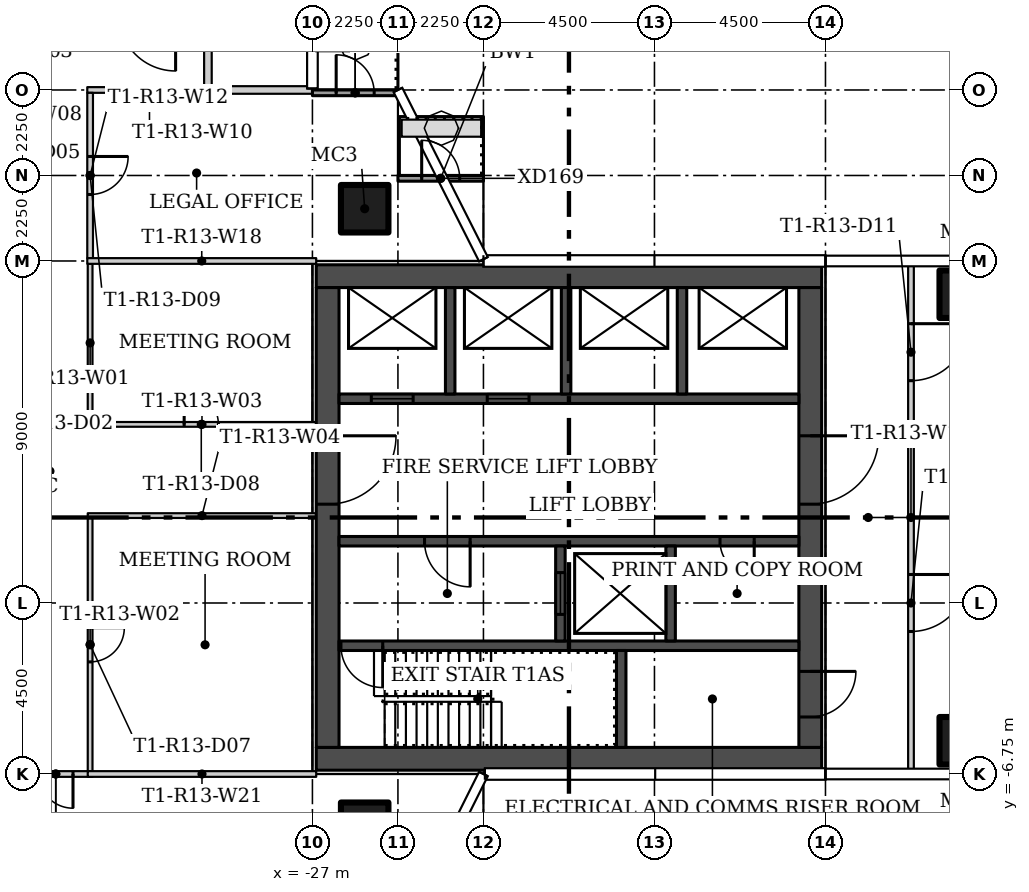
"""IFC4 building model, lengths in metres.
Left out: names, types, materials, properties, quantities, classifications, styles, units other than length and angle.
Written with IfcOpenShell. Run it as: python <this file> out.ifc"""

import sys

from ifc_helpers import new_model, si_unit, direction, frame, frame_2d, origin, origin_2d, place, context, subcontext, project, spatial, rectangle, hollow_rectangle, extrude, element, fill, save


model = new_model("IFC4")
c1 = context("Model", 3, precision=1e-05, world=origin(), true_north=direction((0.0, 1.0)))
c2 = subcontext(c1, "Body", "Model", "MODEL_VIEW")
j1 = project(units=[si_unit("LENGTHUNIT", "METRE"), si_unit("PLANEANGLEUNIT", "RADIAN")], contexts=[c1])
p1 = place(None, origin())
s1 = spatial("IfcSite", under=j1, at=p1, CompositionType="ELEMENT")
p2 = place(p1, origin())
s2 = spatial("IfcBuilding", under=s1, at=p2, CompositionType="ELEMENT")
p3 = place(p2, frame((0.0, 0.0, 120.9)))
s3 = spatial("IfcBuildingStorey", under=s2, at=p3, CompositionType="ELEMENT", Elevation=120.9)
for number, where in (
    (1, (-25.625, 8.125, 0.0)),
    (2, (-25.625, -8.125, 0.0)),
    (3, (-9.875, -5.875, 0.0)),
    (4, (-9.875, 5.875, 0.0)),
):
    element("IfcColumn", number, at=place(p3, frame(where)), inside=s3, PredefinedType="COLUMN", context=c2, shape_type="SweptSolid", body=[
        extrude(hollow_rectangle(XDim=1.25, YDim=1.25, WallThickness=0.05, at=origin_2d()), origin(), (0.0, 0.0, 1.0), 3.55),
    ])
p4 = place(p3, frame((-32.85, 6.675, 0.0), z_axis=(0.0, 0.0, 1.0), x_axis=(0.0, -1.0, 0.0)))
e5 = element("IfcWall", 5, at=p4, inside=s3, PredefinedType="PARTITIONING", context=c2, shape_type="SweptSolid", body=[
    extrude(rectangle(XDim=4.162, YDim=0.125, at=frame_2d((2.081, 0.0))), origin(), (0.0, 0.0, 1.0), 3.55),
])
p5 = place(p3, frame((-32.85, -0.013, 0.0), z_axis=(0.0, 0.0, 1.0), x_axis=(0.0, -1.0, 0.0)))
e6 = element("IfcWall", 6, at=p5, inside=s3, PredefinedType="PARTITIONING", context=c2, shape_type="SweptSolid", body=[
    extrude(rectangle(XDim=6.662, YDim=0.125, at=frame_2d((3.331, 0.0))), origin(), (0.0, 0.0, 1.0), 3.55),
])
p6 = place(p5, frame((2.887, 0.0, 0.0)))
e7 = element("IfcOpeningElement", 7, at=p6, cuts=e6, PredefinedType="OPENING", context=c2, shape_type="SweptSolid", body=[
    extrude(rectangle(XDim=0.9, YDim=2.1, at=frame_2d((0.45, 1.05))), frame((0.0, 0.073, 0.0), z_axis=(0.0, -1.0, 0.0), x_axis=(1.0, 0.0, 0.0)), (0.0, 0.0, 1.0), 0.145),
])
p7 = place(p3, frame((-32.912, 2.45, 0.0)))
e8 = element("IfcWall", 8, at=p7, inside=s3, PredefinedType="PARTITIONING", context=c2, shape_type="SweptSolid", body=[
    extrude(rectangle(XDim=6.012, YDim=0.125, at=frame_2d((3.006, 0.0))), origin(), (0.0, 0.0, 1.0), 3.55),
])
p8 = place(p7, frame((2.537, 0.0, 0.0)))
e9 = element("IfcOpeningElement", 9, at=p8, cuts=e8, PredefinedType="OPENING", context=c2, shape_type="SweptSolid", body=[
    extrude(rectangle(XDim=0.9, YDim=2.1, at=frame_2d((0.45, 1.05))), frame((0.0, 0.073, 0.0), z_axis=(0.0, -1.0, 0.0), x_axis=(1.0, 0.0, 0.0)), (0.0, 0.0, 1.0), 0.145),
])
p9 = place(p3, frame((-26.9, 0.05, 0.0), z_axis=(0.0, 0.0, 1.0), x_axis=(-1.0, 0.0, 0.0)))
e10 = element("IfcWall", 10, at=p9, inside=s3, PredefinedType="PARTITIONING", context=c2, shape_type="SweptSolid", body=[
    extrude(rectangle(XDim=6.012, YDim=0.125, at=frame_2d((3.006, 0.0))), origin(), (0.0, 0.0, 1.0), 3.55),
])
p10 = place(p3, frame((-29.65, 11.25, 0.0), z_axis=(0.0, 0.0, 1.0), x_axis=(-1.0, 0.0, 0.0)))
e11 = element("IfcWall", 11, at=p10, inside=s3, PredefinedType="PARTITIONING", context=c2, shape_type="SweptSolid", body=[
    extrude(rectangle(XDim=3.275, YDim=0.15, at=frame_2d((1.637, 0.0))), origin(), (0.0, 0.0, 1.0), 3.55),
])
p11 = place(p3, frame((-32.85, 11.175, 0.0), z_axis=(0.0, 0.0, 1.0), x_axis=(0.0, -1.0, 0.0)))
e12 = element("IfcWall", 12, at=p11, inside=s3, PredefinedType="PARTITIONING", context=c2, shape_type="SweptSolid", body=[
    extrude(rectangle(XDim=4.35, YDim=0.15, at=frame_2d((2.175, 0.0))), origin(), (0.0, 0.0, 1.0), 3.55),
])
p12 = place(p11, frame((1.675, 0.0, 0.0)))
e13 = element("IfcOpeningElement", 13, at=p12, cuts=e12, PredefinedType="OPENING", context=c2, shape_type="SweptSolid", body=[
    extrude(rectangle(XDim=1.0, YDim=2.4, at=frame_2d((0.5, 1.2))), frame((0.0, 0.085, 0.0), z_axis=(0.0, -1.0, 0.0), x_axis=(1.0, 0.0, 0.0)), (0.0, 0.0, 1.0), 0.17),
])
p13 = place(p3, frame((-29.75, 11.35, 0.0), z_axis=(0.0, 0.0, 1.0), x_axis=(0.0, 1.0, 0.0)))
e14 = element("IfcWall", 14, at=p13, inside=s3, PredefinedType="PARTITIONING", context=c2, shape_type="SweptSolid", body=[
    extrude(rectangle(XDim=1.8, YDim=0.2, at=frame_2d((0.9, 0.0))), origin(), (0.0, 0.0, 1.0), 3.55),
])
p14 = place(p3, frame((-32.787, -6.75, 0.0), z_axis=(0.0, 0.0, 1.0), x_axis=(-1.0, 0.0, 0.0)))
e15 = element("IfcWall", 15, at=p14, inside=s3, PredefinedType="PARTITIONING", context=c2, shape_type="SweptSolid", body=[
    extrude(rectangle(XDim=1.938, YDim=0.15, at=frame_2d((0.969, 0.0))), origin(), (0.0, 0.0, 1.0), 3.55),
])
p15 = place(p14, frame((0.513, 0.0, 0.0)))
e16 = element("IfcOpeningElement", 16, at=p15, cuts=e15, PredefinedType="OPENING", context=c2, shape_type="SweptSolid", body=[
    extrude(rectangle(XDim=0.9, YDim=2.1, at=frame_2d((0.45, 1.05))), frame((0.0, 0.085, 0.0), z_axis=(0.0, -1.0, 0.0), x_axis=(1.0, 0.0, 0.0)), (0.0, 0.0, 1.0), 0.17),
])
p16 = place(p3, frame((-11.25, 6.655, 0.0), z_axis=(0.0, 0.0, 1.0), x_axis=(0.0, -1.0, 0.0)))
e17 = element("IfcWall", 17, at=p16, inside=s3, PredefinedType="PARTITIONING", context=c2, shape_type="SweptSolid", body=[
    extrude(rectangle(XDim=13.31, YDim=0.15, at=frame_2d((6.655, 0.0))), origin(), (0.0, 0.0, 1.0), 3.55),
])
p17 = place(p16, frame((1.555, 0.0, 0.0)))
e18 = element("IfcOpeningElement", 18, at=p17, cuts=e17, PredefinedType="OPENING", context=c2, shape_type="SweptSolid", body=[
    extrude(rectangle(XDim=1.5, YDim=2.1, at=frame_2d((0.75, 1.05))), frame((0.0, 0.085, 0.0), z_axis=(0.0, -1.0, 0.0), x_axis=(1.0, 0.0, 0.0)), (0.0, 0.0, 1.0), 0.17),
])
p18 = place(p16, frame((8.155, 0.0, 0.0)))
e19 = element("IfcOpeningElement", 19, at=p18, cuts=e17, PredefinedType="OPENING", context=c2, shape_type="SweptSolid", body=[
    extrude(rectangle(XDim=1.5, YDim=2.1, at=frame_2d((0.75, 1.05))), frame((0.0, 0.085, 0.0), z_axis=(0.0, -1.0, 0.0), x_axis=(1.0, 0.0, 0.0)), (0.0, 0.0, 1.0), 0.17),
])
p19 = place(p3, frame((-26.9, 6.75, 0.0), z_axis=(0.0, 0.0, 1.0), x_axis=(-1.0, 0.0, 0.0)))
e20 = element("IfcWall", 20, at=p19, inside=s3, PredefinedType="PARTITIONING", context=c2, shape_type="SweptSolid", body=[
    extrude(rectangle(XDim=6.025, YDim=0.15, at=frame_2d((3.012, 0.0))), origin(), (0.0, 0.0, 1.0), 3.55),
])
p20 = place(p3, frame((-32.912, -6.75, 0.0)))
e21 = element("IfcWall", 21, at=p20, inside=s3, PredefinedType="PARTITIONING", context=c2, shape_type="SweptSolid", body=[
    extrude(rectangle(XDim=6.012, YDim=0.15, at=frame_2d((3.006, 0.0))), origin(), (0.0, 0.0, 1.0), 3.55),
])
p21 = place(p3, frame((-27.0, 11.25, 0.0), z_axis=(0.0, 0.0, 1.0), x_axis=(-1.0, 0.0, 0.0)))
e22 = element("IfcWall", 22, at=p21, inside=s3, PredefinedType="PARTITIONING", context=c2, shape_type="SweptSolid", body=[
    extrude(rectangle(XDim=2.85, YDim=0.2, at=frame_2d((1.425, 0.0))), origin(), (0.0, 0.0, 1.0), 3.55),
])
p22 = place(p3, frame((-4.595, 2.25, 0.0), z_axis=(0.0, 0.0, 1.0), x_axis=(-1.0, 0.0, 0.0)))
e23 = element("IfcWall", 23, at=p22, inside=s3, PredefinedType="PARTITIONING", context=c2, shape_type="SweptSolid", body=[
    extrude(rectangle(XDim=6.58, YDim=0.15, at=frame_2d((3.29, 0.0))), origin(), (0.0, 0.0, 1.0), 3.55),
])
p23 = place(p3, frame((-24.75, 8.925, 0.0)))
e24 = element("IfcWall", 24, at=p23, inside=s3, PredefinedType="SOLIDWALL", context=c2, shape_type="SweptSolid", body=[
    extrude(rectangle(XDim=2.25, YDim=0.15, at=frame_2d((1.125, 0.0))), origin(), (0.0, 0.0, 1.0), 3.45),
])
p24 = place(p23, frame((0.625, 0.0, 0.0)))
e25 = element("IfcOpeningElement", 25, at=p24, cuts=e24, PredefinedType="OPENING", context=c2, shape_type="SweptSolid", body=[
    extrude(rectangle(XDim=1.0, YDim=2.4, at=frame_2d((0.5, 1.2))), frame((0.0, 0.085, 0.0), z_axis=(0.0, -1.0, 0.0), x_axis=(1.0, 0.0, 0.0)), (0.0, 0.0, 1.0), 0.17),
])
p25 = place(p3, frame((-27.0, 11.175, 0.0)))
e26 = element("IfcWall", 26, at=p25, inside=s3, PredefinedType="SOLIDWALL", context=c2, shape_type="SweptSolid", body=[
    extrude(rectangle(XDim=2.25, YDim=0.15, at=frame_2d((1.125, 0.0))), origin(), (0.0, 0.0, 1.0), 3.45),
])
p26 = place(p25, frame((0.625, 0.0, 0.0)))
e27 = element("IfcOpeningElement", 27, at=p26, cuts=e26, PredefinedType="OPENING", context=c2, shape_type="SweptSolid", body=[
    extrude(rectangle(XDim=1.0, YDim=2.4, at=frame_2d((0.5, 1.2))), frame((0.0, 0.085, 0.0), z_axis=(0.0, -1.0, 0.0), x_axis=(1.0, 0.0, 0.0)), (0.0, 0.0, 1.0), 0.17),
])
for number, where in (
    (28, (-26.9, -6.35, 0.0)),
    (29, (-26.9, 6.35, 0.0)),
):
    element("IfcWall", number, at=place(p3, frame(where)), inside=s3, PredefinedType="SHEAR", context=c2, shape_type="SweptSolid", body=[
        extrude(rectangle(XDim=13.3, YDim=0.6, at=frame_2d((6.65, 0.0))), origin(), (0.0, 0.0, 1.0), 3.55),
    ])
p27 = place(p3, frame((-26.6, 6.05, 0.0), z_axis=(0.0, 0.0, 1.0), x_axis=(0.0, -1.0, 0.0)))
e30 = element("IfcWall", 30, at=p27, inside=s3, PredefinedType="SHEAR", context=c2, shape_type="SweptSolid", body=[
    extrude(rectangle(XDim=12.1, YDim=0.6, at=frame_2d((6.05, 0.0))), origin(), (0.0, 0.0, 1.0), 3.55),
])
p28 = place(p27, frame((3.9, 0.0, 0.0)))
e31 = element("IfcOpeningElement", 31, at=p28, cuts=e30, PredefinedType="OPENING", context=c2, shape_type="SweptSolid", body=[
    extrude(rectangle(XDim=1.8, YDim=2.4, at=frame_2d((0.9, 1.2))), frame((0.0, 0.31, 0.0), z_axis=(0.0, -1.0, 0.0), x_axis=(1.0, 0.0, 0.0)), (0.0, 0.0, 1.0), 0.62),
])
p29 = place(p3, frame((-13.9, 6.05, 0.0), z_axis=(0.0, 0.0, 1.0), x_axis=(0.0, -1.0, 0.0)))
e32 = element("IfcWall", 32, at=p29, inside=s3, PredefinedType="SHEAR", context=c2, shape_type="SweptSolid", body=[
    extrude(rectangle(XDim=12.1, YDim=0.6, at=frame_2d((6.05, 0.0))), origin(), (0.0, 0.0, 1.0), 3.55),
])
p30 = place(p29, frame((10.1, 0.0, 0.0)))
e33 = element("IfcOpeningElement", 33, at=p30, cuts=e32, PredefinedType="OPENING", context=c2, shape_type="SweptSolid", body=[
    extrude(rectangle(XDim=1.2, YDim=2.1, at=frame_2d((0.6, 1.05))), frame((0.0, 0.31, 0.0), z_axis=(0.0, -1.0, 0.0), x_axis=(1.0, 0.0, 0.0)), (0.0, 0.0, 1.0), 0.62),
])
p31 = place(p29, frame((3.9, 0.0, 0.0)))
e34 = element("IfcOpeningElement", 34, at=p31, cuts=e32, PredefinedType="OPENING", context=c2, shape_type="SweptSolid", body=[
    extrude(rectangle(XDim=1.8, YDim=2.4, at=frame_2d((0.9, 1.2))), frame((0.0, 0.31, 0.0), z_axis=(0.0, -1.0, 0.0), x_axis=(1.0, 0.0, 0.0)), (0.0, 0.0, 1.0), 0.62),
])
p32 = place(p3, frame((-14.2, -3.375, 0.0), z_axis=(0.0, 0.0, 1.0), x_axis=(-1.0, 0.0, 0.0)))
e35 = element("IfcWall", 35, at=p32, inside=s3, PredefinedType="SHEAR", context=c2, shape_type="SweptSolid", body=[
    extrude(rectangle(XDim=12.1, YDim=0.25, at=frame_2d((6.05, 0.0))), origin(), (0.0, 0.0, 1.0), 3.55),
])
p33 = place(p32, frame((10.95, 0.0, 0.0)))
e36 = element("IfcOpeningElement", 36, at=p33, cuts=e35, PredefinedType="OPENING", context=c2, shape_type="SweptSolid", body=[
    extrude(rectangle(XDim=1.1, YDim=2.1, at=frame_2d((0.55, 1.05))), frame((0.0, 0.135, 0.0), z_axis=(0.0, -1.0, 0.0), x_axis=(1.0, 0.0, 0.0)), (0.0, 0.0, 1.0), 0.27),
])
p34 = place(p3, frame((-18.875, -6.05, 0.0), z_axis=(0.0, 0.0, 1.0), x_axis=(0.0, 1.0, 0.0)))
e37 = element("IfcWall", 37, at=p34, inside=s3, PredefinedType="SHEAR", context=c2, shape_type="SweptSolid", body=[
    extrude(rectangle(XDim=2.55, YDim=0.25, at=frame_2d((1.275, 0.0))), origin(), (0.0, 0.0, 1.0), 3.55),
])
p35 = place(p3, frame((-14.2, -0.625, 0.0), z_axis=(0.0, 0.0, 1.0), x_axis=(-1.0, 0.0, 0.0)))
e38 = element("IfcWall", 38, at=p35, inside=s3, PredefinedType="SHEAR", context=c2, shape_type="SweptSolid", body=[
    extrude(rectangle(XDim=12.1, YDim=0.25, at=frame_2d((6.05, 0.0))), origin(), (0.0, 0.0, 1.0), 3.55),
])
p36 = place(p35, frame((8.65, 0.0, 0.0)))
e39 = element("IfcOpeningElement", 39, at=p36, cuts=e38, PredefinedType="OPENING", context=c2, shape_type="SweptSolid", body=[
    extrude(rectangle(XDim=1.2, YDim=2.1, at=frame_2d((0.6, 1.05))), frame((0.0, 0.135, 0.0), z_axis=(0.0, -1.0, 0.0), x_axis=(1.0, 0.0, 0.0)), (0.0, 0.0, 1.0), 0.27),
])
p37 = place(p35, frame((1.175, 0.0, 0.0)))
e40 = element("IfcOpeningElement", 40, at=p37, cuts=e38, PredefinedType="OPENING", context=c2, shape_type="SweptSolid", body=[
    extrude(rectangle(XDim=0.9, YDim=2.1, at=frame_2d((0.45, 1.05))), frame((0.0, 0.135, 0.0), z_axis=(0.0, -1.0, 0.0), x_axis=(1.0, 0.0, 0.0)), (0.0, 0.0, 1.0), 0.27),
])
p38 = place(p3, frame((-20.475, -3.25, 0.0), z_axis=(0.0, 0.0, 1.0), x_axis=(0.0, 1.0, 0.0)))
e41 = element("IfcWall", 41, at=p38, inside=s3, PredefinedType="SHEAR", context=c2, shape_type="SweptSolid", body=[
    extrude(rectangle(XDim=2.5, YDim=0.25, at=frame_2d((1.25, 0.0))), origin(), (0.0, 0.0, 1.0), 3.55),
])
p39 = place(p38, frame((0.7, 0.0, 0.0)))
e42 = element("IfcOpeningElement", 42, at=p39, cuts=e41, PredefinedType="OPENING", context=c2, shape_type="SweptSolid", body=[
    extrude(rectangle(XDim=1.1, YDim=2.1, at=frame_2d((0.55, 1.05))), frame((0.0, 0.135, 0.0), z_axis=(0.0, -1.0, 0.0), x_axis=(1.0, 0.0, 0.0)), (0.0, 0.0, 1.0), 0.27),
])
p40 = place(p3, frame((-17.575, -3.25, 0.0), z_axis=(0.0, 0.0, 1.0), x_axis=(0.0, 1.0, 0.0)))
e43 = element("IfcWall", 43, at=p40, inside=s3, PredefinedType="SHEAR", context=c2, shape_type="SweptSolid", body=[
    extrude(rectangle(XDim=2.5, YDim=0.25, at=frame_2d((1.25, 0.0))), origin(), (0.0, 0.0, 1.0), 3.55),
])
p41 = place(p3, frame((-26.3, 3.125, 0.0)))
e44 = element("IfcWall", 44, at=p41, inside=s3, PredefinedType="SHEAR", context=c2, shape_type="SweptSolid", body=[
    extrude(rectangle(XDim=12.1, YDim=0.25, at=frame_2d((6.05, 0.0))), origin(), (0.0, 0.0, 1.0), 3.55),
])
p42 = place(p41, frame((0.85, 0.0, 0.0)))
e45 = element("IfcOpeningElement", 45, at=p42, cuts=e44, PredefinedType="OPENING", context=c2, shape_type="SweptSolid", body=[
    extrude(rectangle(XDim=1.1, YDim=2.1, at=frame_2d((0.55, 1.05))), frame((0.0, 0.135, 0.0), z_axis=(0.0, -1.0, 0.0), x_axis=(1.0, 0.0, 0.0)), (0.0, 0.0, 1.0), 0.27),
])
p43 = place(p41, frame((3.9, 0.0, 0.0)))
e46 = element("IfcOpeningElement", 46, at=p43, cuts=e44, PredefinedType="OPENING", context=c2, shape_type="SweptSolid", body=[
    extrude(rectangle(XDim=1.1, YDim=2.1, at=frame_2d((0.55, 1.05))), frame((0.0, 0.135, 0.0), z_axis=(0.0, -1.0, 0.0), x_axis=(1.0, 0.0, 0.0)), (0.0, 0.0, 1.0), 0.27),
])
for number, where, z_axis, x_axis in (
    (47, (-23.375, 3.25, 0.0), (0.0, 0.0, 1.0), (0.0, 1.0, 0.0)),
    (48, (-20.325, 3.25, 0.0), (0.0, 0.0, 1.0), (0.0, 1.0, 0.0)),
    (49, (-17.275, 3.25, 0.0), (0.0, 0.0, 1.0), (0.0, 1.0, 0.0)),
):
    element("IfcWall", number, at=place(p3, frame(where, z_axis=z_axis, x_axis=x_axis)), inside=s3, PredefinedType="SHEAR", context=c2, shape_type="SweptSolid", body=[
        extrude(rectangle(XDim=2.8, YDim=0.25, at=frame_2d((1.4, 0.0))), origin(), (0.0, 0.0, 1.0), 3.55),
    ])
p44 = place(p15, origin())
e50 = element("IfcDoor", 50, at=p44, inside=s3, OperationType="SINGLE_SWING_RIGHT", PredefinedType="DOOR", context=c2, shape_type="SweptSolid", body=[
    extrude(rectangle(XDim=0.9, YDim=2.1, at=frame_2d((0.45, 1.05))), frame((0.0, 0.025, 0.0), z_axis=(0.0, -1.0, 0.0), x_axis=(1.0, 0.0, 0.0)), (0.0, 0.0, 1.0), 0.05),
])
fill(e16, e50)
p45 = place(p6, origin())
e51 = element("IfcDoor", 51, at=p45, inside=s3, OperationType="SINGLE_SWING_LEFT", PredefinedType="DOOR", context=c2, shape_type="SweptSolid", body=[
    extrude(rectangle(XDim=0.9, YDim=2.1, at=frame_2d((0.45, 1.05))), frame((0.0, 0.025, 0.0), z_axis=(0.0, -1.0, 0.0), x_axis=(1.0, 0.0, 0.0)), (0.0, 0.0, 1.0), 0.05),
])
fill(e7, e51)
p46 = place(p8, origin())
e52 = element("IfcDoor", 52, at=p46, inside=s3, OperationType="SINGLE_SWING_RIGHT", PredefinedType="DOOR", context=c2, shape_type="SweptSolid", body=[
    extrude(rectangle(XDim=0.9, YDim=2.1, at=frame_2d((0.45, 1.05))), frame((0.0, 0.025, 0.0), z_axis=(0.0, -1.0, 0.0), x_axis=(1.0, 0.0, 0.0)), (0.0, 0.0, 1.0), 0.05),
])
fill(e9, e52)
p47 = place(p12, origin())
e53 = element("IfcDoor", 53, at=p47, inside=s3, OperationType="SINGLE_SWING_LEFT", PredefinedType="DOOR", context=c2, shape_type="SweptSolid", body=[
    extrude(rectangle(XDim=1.0, YDim=2.4, at=frame_2d((0.5, 1.2))), frame((0.0, 0.025, 0.0), z_axis=(0.0, -1.0, 0.0), x_axis=(1.0, 0.0, 0.0)), (0.0, 0.0, 1.0), 0.05),
])
fill(e13, e53)
p48 = place(p17, origin())
e54 = element("IfcDoor", 54, at=p48, inside=s3, OperationType="DOUBLE_DOOR_SINGLE_SWING", PredefinedType="DOOR", context=c2, shape_type="SweptSolid", body=[
    extrude(rectangle(XDim=1.5, YDim=2.1, at=frame_2d((0.75, 1.05))), frame((0.0, 0.025, 0.0), z_axis=(0.0, -1.0, 0.0), x_axis=(1.0, 0.0, 0.0)), (0.0, 0.0, 1.0), 0.05),
])
fill(e18, e54)
p49 = place(p18, origin())
e55 = element("IfcDoor", 55, at=p49, inside=s3, OperationType="DOUBLE_DOOR_SINGLE_SWING", PredefinedType="DOOR", context=c2, shape_type="SweptSolid", body=[
    extrude(rectangle(XDim=1.5, YDim=2.1, at=frame_2d((0.75, 1.05))), frame((0.0, 0.025, 0.0), z_axis=(0.0, -1.0, 0.0), x_axis=(1.0, 0.0, 0.0)), (0.0, 0.0, 1.0), 0.05),
])
fill(e19, e55)
p50 = place(p24, origin())
e56 = element("IfcDoor", 56, at=p50, inside=s3, OperationType="SINGLE_SWING_RIGHT", PredefinedType="DOOR", context=c2, shape_type="SweptSolid", body=[
    extrude(rectangle(XDim=1.0, YDim=2.4, at=frame_2d((0.5, 1.2))), frame((0.0, 0.025, 0.0), z_axis=(0.0, -1.0, 0.0), x_axis=(1.0, 0.0, 0.0)), (0.0, 0.0, 1.0), 0.05),
])
fill(e25, e56)
p51 = place(p26, origin())
e57 = element("IfcDoor", 57, at=p51, inside=s3, OperationType="SINGLE_SWING_LEFT", PredefinedType="DOOR", context=c2, shape_type="SweptSolid", body=[
    extrude(rectangle(XDim=1.0, YDim=2.4, at=frame_2d((0.5, 1.2))), frame((0.0, 0.025, 0.0), z_axis=(0.0, -1.0, 0.0), x_axis=(1.0, 0.0, 0.0)), (0.0, 0.0, 1.0), 0.05),
])
fill(e27, e57)
p52 = place(p28, origin())
e58 = element("IfcDoor", 58, at=p52, inside=s3, OperationType="DOUBLE_DOOR_SINGLE_SWING", PredefinedType="DOOR", context=c2, shape_type="SweptSolid", body=[
    extrude(rectangle(XDim=1.8, YDim=2.4, at=frame_2d((0.9, 1.2))), frame((0.0, 0.025, 0.0), z_axis=(0.0, -1.0, 0.0), x_axis=(1.0, 0.0, 0.0)), (0.0, 0.0, 1.0), 0.05),
])
fill(e31, e58)
p53 = place(p30, origin())
e59 = element("IfcDoor", 59, at=p53, inside=s3, OperationType="SINGLE_SWING_RIGHT", PredefinedType="DOOR", context=c2, shape_type="SweptSolid", body=[
    extrude(rectangle(XDim=1.2, YDim=2.1, at=frame_2d((0.6, 1.05))), frame((0.0, 0.025, 0.0), z_axis=(0.0, -1.0, 0.0), x_axis=(1.0, 0.0, 0.0)), (0.0, 0.0, 1.0), 0.05),
])
fill(e33, e59)
p54 = place(p31, origin())
e60 = element("IfcDoor", 60, at=p54, inside=s3, OperationType="DOUBLE_DOOR_SINGLE_SWING", PredefinedType="DOOR", context=c2, shape_type="SweptSolid", body=[
    extrude(rectangle(XDim=1.8, YDim=2.4, at=frame_2d((0.9, 1.2))), frame((0.0, 0.025, 0.0), z_axis=(0.0, -1.0, 0.0), x_axis=(1.0, 0.0, 0.0)), (0.0, 0.0, 1.0), 0.05),
])
fill(e34, e60)
p55 = place(p33, origin())
e61 = element("IfcDoor", 61, at=p55, inside=s3, OperationType="SINGLE_SWING_RIGHT", PredefinedType="DOOR", context=c2, shape_type="SweptSolid", body=[
    extrude(rectangle(XDim=1.1, YDim=2.1, at=frame_2d((0.55, 1.05))), frame((0.0, 0.025, 0.0), z_axis=(0.0, -1.0, 0.0), x_axis=(1.0, 0.0, 0.0)), (0.0, 0.0, 1.0), 0.05),
])
fill(e36, e61)
p56 = place(p36, origin())
e62 = element("IfcDoor", 62, at=p56, inside=s3, OperationType="SINGLE_SWING_RIGHT", PredefinedType="DOOR", context=c2, shape_type="SweptSolid", body=[
    extrude(rectangle(XDim=1.2, YDim=2.1, at=frame_2d((0.6, 1.05))), frame((0.0, 0.025, 0.0), z_axis=(0.0, -1.0, 0.0), x_axis=(1.0, 0.0, 0.0)), (0.0, 0.0, 1.0), 0.05),
])
fill(e39, e62)
p57 = place(p37, origin())
e63 = element("IfcDoor", 63, at=p57, inside=s3, OperationType="SINGLE_SWING_LEFT", PredefinedType="DOOR", context=c2, shape_type="SweptSolid", body=[
    extrude(rectangle(XDim=0.9, YDim=2.1, at=frame_2d((0.45, 1.05))), frame((0.0, 0.025, 0.0), z_axis=(0.0, -1.0, 0.0), x_axis=(1.0, 0.0, 0.0)), (0.0, 0.0, 1.0), 0.05),
])
fill(e40, e63)
p58 = place(p39, origin())
e64 = element("IfcDoor", 64, at=p58, inside=s3, OperationType="SLIDING_TO_LEFT", PredefinedType="DOOR", context=c2, shape_type="SweptSolid", body=[
    extrude(rectangle(XDim=1.1, YDim=2.1, at=frame_2d((0.55, 1.05))), frame((0.0, 0.025, 0.0), z_axis=(0.0, -1.0, 0.0), x_axis=(1.0, 0.0, 0.0)), (0.0, 0.0, 1.0), 0.05),
])
fill(e42, e64)
p59 = place(p42, origin())
e65 = element("IfcDoor", 65, at=p59, inside=s3, OperationType="SLIDING_TO_LEFT", PredefinedType="DOOR", context=c2, shape_type="SweptSolid", body=[
    extrude(rectangle(XDim=1.1, YDim=2.1, at=frame_2d((0.55, 1.05))), frame((0.0, 0.025, 0.0), z_axis=(0.0, -1.0, 0.0), x_axis=(1.0, 0.0, 0.0)), (0.0, 0.0, 1.0), 0.05),
])
fill(e45, e65)
p60 = place(p43, origin())
e66 = element("IfcDoor", 66, at=p60, inside=s3, OperationType="SLIDING_TO_LEFT", PredefinedType="DOOR", context=c2, shape_type="SweptSolid", body=[
    extrude(rectangle(XDim=1.1, YDim=2.1, at=frame_2d((0.55, 1.05))), frame((0.0, 0.025, 0.0), z_axis=(0.0, -1.0, 0.0), x_axis=(1.0, 0.0, 0.0)), (0.0, 0.0, 1.0), 0.05),
])
fill(e46, e66)
save(model, sys.argv[1])
